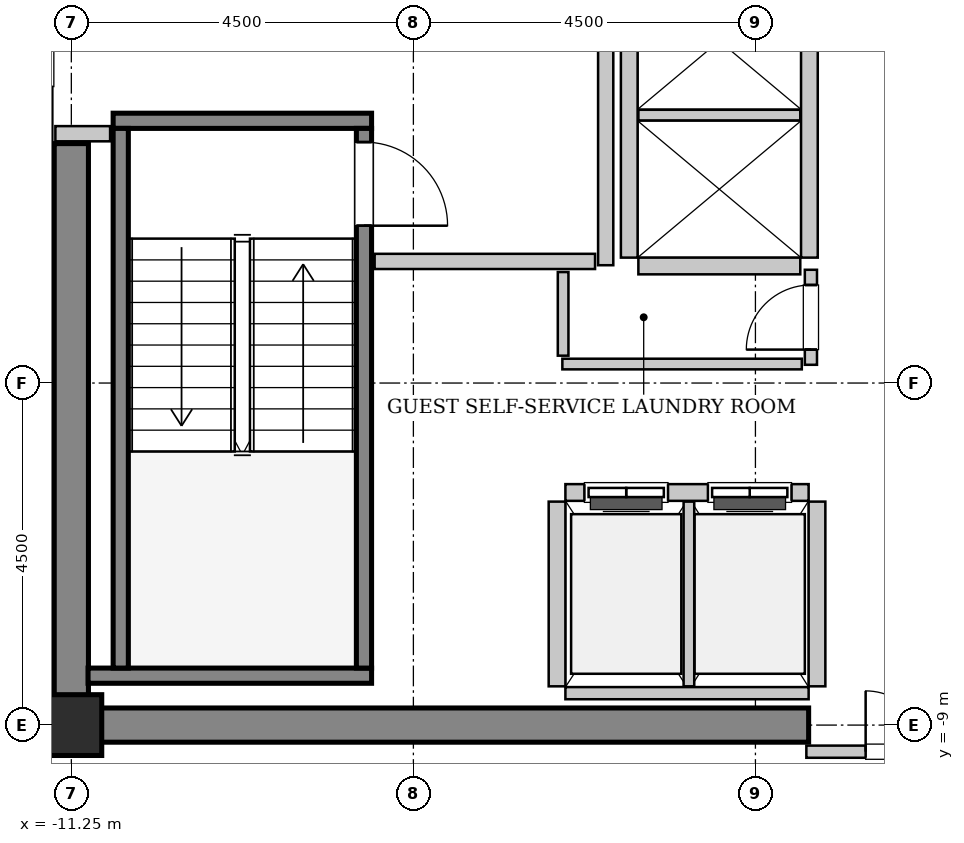
"""IFC4 building model, lengths in metres.
Left out: names, types, materials, properties, quantities, classifications, styles, units other than length and angle.
Written with IfcOpenShell. Run it as: python <this file> out.ifc"""

import sys

from ifc_helpers import new_model, si_unit, direction, frame, frame_2d, origin, origin_2d, place, context, subcontext, project, spatial, rectangle, hollow_rectangle, extrude, source, transform, mapped, element, fill, save


model = new_model("IFC4")
c1 = context("Model", 3, precision=1e-05, world=origin(), true_north=direction((0.0, 1.0)))
c2 = subcontext(c1, "Body", "Model", "MODEL_VIEW")
j1 = project(units=[si_unit("LENGTHUNIT", "METRE"), si_unit("PLANEANGLEUNIT", "RADIAN")], contexts=[c1])
p1 = place(None, origin())
s1 = spatial("IfcSite", under=j1, at=p1, CompositionType="ELEMENT")
p2 = place(p1, origin())
s2 = spatial("IfcBuilding", under=s1, at=p2, CompositionType="ELEMENT")
p3 = place(p2, frame((0.0, 0.0, 248.4)))
s3 = spatial("IfcBuildingStorey", under=s2, at=p3, CompositionType="ELEMENT", Elevation=248.4)
m1 = source(origin(), c2, "Body", "SweptSolid", [
    extrude(rectangle(XDim=9.925, YDim=0.45, at=frame_2d((4.962, 0.0))), origin(), (0.0, 0.0, 1.0), 3.8),
])
p4 = place(p3, frame((-11.475, -9.0, 0.0), z_axis=(0.0, 0.0, 1.0), x_axis=(1.0, 0.0, 0.0)))
e1 = element("IfcWall", 1, at=p4, inside=s3, PredefinedType="SHEAR", context=c2, shape_type="MappedRepresentation", body=[
    mapped(m1, transform((0.0, 0.0, 0.0), x_axis=(1.0, 0.0, 0.0), y_axis=(0.0, 1.0, 0.0), z_axis=(0.0, 0.0, 1.0), scale=1.0)),
])
m2 = source(origin(), c2, "Body", "SweptSolid", [
    extrude(rectangle(XDim=7.425, YDim=0.45, at=frame_2d((3.712, 0.0))), origin(), (0.0, 0.0, 1.0), 3.8),
])
p5 = place(p3, frame((-11.25, -8.775, 0.0), z_axis=(0.0, 0.0, 1.0), x_axis=(0.0, 1.0, 0.0)))
e2 = element("IfcWall", 2, at=p5, inside=s3, PredefinedType="SHEAR", context=c2, shape_type="MappedRepresentation", body=[
    mapped(m2, transform((0.0, 0.0, 0.0), x_axis=(1.0, 0.0, 0.0), y_axis=(0.0, 1.0, 0.0), z_axis=(0.0, 0.0, 1.0), scale=1.0)),
])
m3 = source(origin(), c2, "Body", "SweptSolid", [
    extrude(hollow_rectangle(XDim=0.8, YDim=0.8, WallThickness=0.04, InnerFilletRadius=0.04, OuterFilletRadius=0.08, at=origin_2d()), origin(), (0.0, 0.0, 1.0), 3.8),
])
p6 = place(p3, frame((-11.25, -9.0, 0.0), z_axis=(0.0, 0.0, 1.0), x_axis=(1.0, 0.0, 0.0)))
e3 = element("IfcColumn", 3, at=p6, inside=s3, PredefinedType="COLUMN", context=c2, shape_type="MappedRepresentation", body=[
    mapped(m3, transform((0.0, 0.0, 0.0), x_axis=(1.0, 0.0, 0.0), y_axis=(0.0, 1.0, 0.0), z_axis=(0.0, 0.0, 1.0), scale=1.0)),
])
m4 = source(origin(), c2, "Body", "SweptSolid", [
    extrude(rectangle(XDim=3.4, YDim=0.2, at=frame_2d((1.7, 0.0))), origin(), (0.0, 0.0, 1.0), 3.8),
])
p7 = place(p3, frame((-10.7, -1.05, 0.0), z_axis=(0.0, 0.0, 1.0), x_axis=(1.0, 0.0, 0.0)))
e4 = element("IfcWall", 4, at=p7, inside=s3, PredefinedType="SOLIDWALL", context=c2, shape_type="MappedRepresentation", body=[
    mapped(m4, transform((0.0, 0.0, 0.0), x_axis=(1.0, 0.0, 0.0), y_axis=(0.0, 1.0, 0.0), z_axis=(0.0, 0.0, 1.0), scale=1.0)),
])
m5 = source(origin(), c2, "Body", "SweptSolid", [
    extrude(rectangle(XDim=3.73, YDim=0.2, at=frame_2d((1.865, 0.0))), origin(), (0.0, 0.0, 1.0), 3.8),
])
p8 = place(p3, frame((-11.03, -8.35, 0.0), z_axis=(0.0, 0.0, 1.0), x_axis=(1.0, 0.0, 0.0)))
e5 = element("IfcWall", 5, at=p8, inside=s3, PredefinedType="SOLIDWALL", context=c2, shape_type="MappedRepresentation", body=[
    mapped(m5, transform((0.0, 0.0, 0.0), x_axis=(1.0, 0.0, 0.0), y_axis=(0.0, 1.0, 0.0), z_axis=(0.0, 0.0, 1.0), scale=1.0)),
])
m6 = source(origin(), c2, "Body", "SweptSolid", [
    extrude(rectangle(XDim=7.1, YDim=0.2, at=frame_2d((3.55, 0.0))), origin(), (0.0, 0.0, 1.0), 3.8),
])
p9 = place(p3, frame((-10.6, -1.15, 0.0), z_axis=(0.0, 0.0, 1.0), x_axis=(0.0, -1.0, 0.0)))
e6 = element("IfcWall", 6, at=p9, inside=s3, PredefinedType="SOLIDWALL", context=c2, shape_type="MappedRepresentation", body=[
    mapped(m6, transform((0.0, 0.0, 0.0), x_axis=(1.0, 0.0, 0.0), y_axis=(0.0, 1.0, 0.0), z_axis=(0.0, 0.0, 1.0), scale=1.0)),
])
p10 = place(p3, frame((-7.4, -1.15, 0.0), z_axis=(0.0, 0.0, 1.0), x_axis=(0.0, -1.0, 0.0)))
e7 = element("IfcWall", 7, at=p10, inside=s3, PredefinedType="SOLIDWALL", context=c2, shape_type="MappedRepresentation", body=[
    mapped(m6, transform((0.0, 0.0, 0.0), x_axis=(1.0, 0.0, 0.0), y_axis=(0.0, 1.0, 0.0), z_axis=(0.0, 0.0, 1.0), scale=1.0)),
])
p11 = place(p10, frame((0.18, 0.0, 0.0)))
e8 = element("IfcOpeningElement", 8, at=p11, cuts=e7, PredefinedType="OPENING", context=c2, shape_type="SweptSolid", body=[
    extrude(rectangle(XDim=1.1, YDim=2.15, at=frame_2d((0.55, 1.075))), frame((0.0, 0.11, 0.0), z_axis=(0.0, -1.0, 0.0), x_axis=(1.0, 0.0, 0.0)), (0.0, 0.0, 1.0), 0.22),
])
m7 = source(origin(), c2, "Body", "SweptSolid", [
    extrude(rectangle(XDim=3.2, YDim=0.22, at=frame_2d((1.6, 0.0))), origin(), (0.0, 0.0, 1.0), 3.535),
])
p12 = place(p3, frame((-1.55, -5.94, 0.0), z_axis=(0.0, 0.0, 1.0), x_axis=(-1.0, 0.0, 0.0)))
e9 = element("IfcWall", 9, at=p12, inside=s3, PredefinedType="SOLIDWALL", context=c2, shape_type="MappedRepresentation", body=[
    mapped(m7, transform((0.0, 0.0, 0.0), x_axis=(1.0, 0.0, 0.0), y_axis=(0.0, 1.0, 0.0), z_axis=(0.0, 0.0, 1.0), scale=1.0)),
])
p13 = place(p12, frame((1.85, 0.0, 0.0)))
e10 = element("IfcOpeningElement", 10, at=p13, cuts=e9, PredefinedType="OPENING", context=c2, shape_type="SweptSolid", body=[
    extrude(rectangle(XDim=1.1, YDim=2.2, at=frame_2d((0.55, 1.1))), frame((0.0, 0.12, 0.0), z_axis=(0.0, -1.0, 0.0), x_axis=(1.0, 0.0, 0.0)), (0.0, 0.0, 1.0), 0.24),
])
p14 = place(p12, frame((0.225, 0.0, 0.0)))
e11 = element("IfcOpeningElement", 11, at=p14, cuts=e9, PredefinedType="OPENING", context=c2, shape_type="SweptSolid", body=[
    extrude(rectangle(XDim=1.1, YDim=2.2, at=frame_2d((0.55, 1.1))), frame((0.0, 0.12, 0.0), z_axis=(0.0, -1.0, 0.0), x_axis=(1.0, 0.0, 0.0)), (0.0, 0.0, 1.0), 0.24),
])
m8 = source(origin(), c2, "Body", "SweptSolid", [
    extrude(rectangle(XDim=3.2, YDim=0.16, at=frame_2d((1.6, 0.0))), origin(), (0.0, 0.0, 1.0), 2.625),
])
p15 = place(p3, frame((-4.75, -8.58, 0.0), z_axis=(0.0, 0.0, 1.0), x_axis=(1.0, 0.0, 0.0)))
e12 = element("IfcWall", 12, at=p15, inside=s3, PredefinedType="PARTITIONING", context=c2, shape_type="MappedRepresentation", body=[
    mapped(m8, transform((0.0, 0.0, 0.0), x_axis=(1.0, 0.0, 0.0), y_axis=(0.0, 1.0, 0.0), z_axis=(0.0, 0.0, 1.0), scale=1.0)),
])
m9 = source(origin(), c2, "Body", "SweptSolid", [
    extrude(rectangle(XDim=2.43, YDim=0.22, at=frame_2d((1.215, 0.0))), origin(), (0.0, 0.0, 1.0), 3.535),
])
p16 = place(p3, frame((-4.86, -6.06, 0.0), z_axis=(0.0, 0.0, 1.0), x_axis=(0.0, -1.0, 0.0)))
e13 = element("IfcWall", 13, at=p16, inside=s3, PredefinedType="SOLIDWALL", context=c2, shape_type="MappedRepresentation", body=[
    mapped(m9, transform((0.0, 0.0, 0.0), x_axis=(1.0, 0.0, 0.0), y_axis=(0.0, 1.0, 0.0), z_axis=(0.0, 0.0, 1.0), scale=1.0)),
])
m10 = source(origin(), c2, "Body", "SweptSolid", [
    extrude(rectangle(XDim=2.43, YDim=0.14, at=frame_2d((1.215, 0.0))), origin(), (0.0, 0.0, 1.0), 3.535),
])
p17 = place(p3, frame((-3.125, -8.49, 0.0), z_axis=(0.0, 0.0, 1.0), x_axis=(0.0, 1.0, 0.0)))
e14 = element("IfcWall", 14, at=p17, inside=s3, PredefinedType="PARTITIONING", context=c2, shape_type="MappedRepresentation", body=[
    mapped(m10, transform((0.0, 0.0, 0.0), x_axis=(1.0, 0.0, 0.0), y_axis=(0.0, 1.0, 0.0), z_axis=(0.0, 0.0, 1.0), scale=1.0)),
])
p18 = place(p3, frame((-1.44, -8.49, 0.0), z_axis=(0.0, 0.0, 1.0), x_axis=(0.0, 1.0, 0.0)))
e15 = element("IfcWall", 15, at=p18, inside=s3, PredefinedType="SOLIDWALL", context=c2, shape_type="MappedRepresentation", body=[
    mapped(m9, transform((0.0, 0.0, 0.0), x_axis=(1.0, 0.0, 0.0), y_axis=(0.0, 1.0, 0.0), z_axis=(0.0, 0.0, 1.0), scale=1.0)),
])
m11 = source(origin(), c2, "Body", "SweptSolid", [
    extrude(rectangle(XDim=5.7, YDim=0.22, at=frame_2d((2.85, 0.0))), origin(), (0.0, 0.0, 1.0), 3.535),
])
for number, where, z_axis, x_axis in (
    (16, (-1.54, -2.85, 0.0), (0.0, 0.0, 1.0), (0.0, 1.0, 0.0)),
    (17, (-3.91, 2.85, 0.0), (0.0, 0.0, 1.0), (0.0, -1.0, 0.0)),
):
    element("IfcWall", number, at=place(p3, frame(where, z_axis=z_axis, x_axis=x_axis)), inside=s3, PredefinedType="SOLIDWALL", context=c2, shape_type="MappedRepresentation", body=[
        mapped(m11, transform((0.0, 0.0, 0.0), x_axis=(1.0, 0.0, 0.0), y_axis=(0.0, 1.0, 0.0), z_axis=(0.0, 0.0, 1.0), scale=1.0)),
    ])
m12 = source(origin(), c2, "Body", "SweptSolid", [
    extrude(rectangle(XDim=2.13, YDim=0.22, at=frame_2d((1.065, 0.0))), origin(), (0.0, 0.0, 1.0), 3.535),
])
p19 = place(p3, frame((-3.79, -2.96, 0.0), z_axis=(0.0, 0.0, 1.0), x_axis=(1.0, 0.0, 0.0)))
e18 = element("IfcWall", 18, at=p19, inside=s3, PredefinedType="SOLIDWALL", context=c2, shape_type="MappedRepresentation", body=[
    mapped(m12, transform((0.0, 0.0, 0.0), x_axis=(1.0, 0.0, 0.0), y_axis=(0.0, 1.0, 0.0), z_axis=(0.0, 0.0, 1.0), scale=1.0)),
])
m13 = source(origin(), c2, "Body", "SweptSolid", [
    extrude(rectangle(XDim=2.13, YDim=0.14, at=frame_2d((1.065, 0.0))), origin(), (0.0, 0.0, 1.0), 3.535),
])
p20 = place(p3, frame((-3.79, -0.975, 0.0), z_axis=(0.0, 0.0, 1.0), x_axis=(1.0, 0.0, 0.0)))
e19 = element("IfcWall", 19, at=p20, inside=s3, PredefinedType="PARTITIONING", context=c2, shape_type="MappedRepresentation", body=[
    mapped(m13, transform((0.0, 0.0, 0.0), x_axis=(1.0, 0.0, 0.0), y_axis=(0.0, 1.0, 0.0), z_axis=(0.0, 0.0, 1.0), scale=1.0)),
])
m14 = source(origin(), c2, "Body", "SweptSolid", [
    extrude(rectangle(XDim=5.9, YDim=0.2, at=frame_2d((2.95, 0.0))), origin(), (0.0, 0.0, 1.0), 3.535),
])
p21 = place(p3, frame((-4.22, -2.95, 0.0), z_axis=(0.0, 0.0, 1.0), x_axis=(0.0, 1.0, 0.0)))
e20 = element("IfcWall", 20, at=p21, inside=s3, PredefinedType="PARTITIONING", context=c2, shape_type="MappedRepresentation", body=[
    mapped(m14, transform((0.0, 0.0, 0.0), x_axis=(1.0, 0.0, 0.0), y_axis=(0.0, 1.0, 0.0), z_axis=(0.0, 0.0, 1.0), scale=1.0)),
])
m15 = source(origin(), c2, "Body", "SweptSolid", [
    extrude(rectangle(XDim=2.9, YDim=0.2, at=frame_2d((1.45, 0.0))), origin(), (0.0, 0.0, 1.0), 3.535),
])
p22 = place(p3, frame((-7.26, -2.9, 0.0), z_axis=(0.0, 0.0, 1.0), x_axis=(1.0, 0.0, 0.0)))
e21 = element("IfcWall", 21, at=p22, inside=s3, PredefinedType="PARTITIONING", context=c2, shape_type="MappedRepresentation", body=[
    mapped(m15, transform((0.0, 0.0, 0.0), x_axis=(1.0, 0.0, 0.0), y_axis=(0.0, 1.0, 0.0), z_axis=(0.0, 0.0, 1.0), scale=1.0)),
])
m16 = source(origin(), c2, "Body", "SweptSolid", [
    extrude(rectangle(XDim=0.72, YDim=0.2, at=frame_2d((0.36, 0.0))), origin(), (0.0, 0.0, 1.0), 3.535),
])
p23 = place(p3, frame((-11.46, -1.22, 0.0), z_axis=(0.0, 0.0, 1.0), x_axis=(1.0, 0.0, 0.0)))
e22 = element("IfcWall", 22, at=p23, inside=s3, PredefinedType="PARTITIONING", context=c2, shape_type="MappedRepresentation", body=[
    mapped(m16, transform((0.0, 0.0, 0.0), x_axis=(1.0, 0.0, 0.0), y_axis=(0.0, 1.0, 0.0), z_axis=(0.0, 0.0, 1.0), scale=1.0)),
])
m17 = source(origin(), c2, "Body", "SweptSolid", [
    extrude(rectangle(XDim=3.16, YDim=0.16, at=frame_2d((1.58, 0.0))), origin(), (0.0, 0.0, 1.0), 2.625),
])
p24 = place(p3, frame((-1.58, -9.35, 0.0), z_axis=(0.0, 0.0, 1.0), x_axis=(1.0, 0.0, 0.0)))
e23 = element("IfcWall", 23, at=p24, inside=s3, PredefinedType="PARTITIONING", context=c2, shape_type="MappedRepresentation", body=[
    mapped(m17, transform((0.0, 0.0, 0.0), x_axis=(1.0, 0.0, 0.0), y_axis=(0.0, 1.0, 0.0), z_axis=(0.0, 0.0, 1.0), scale=1.0)),
])
p25 = place(p24, frame((0.78, 0.0, 0.0)))
e24 = element("IfcOpeningElement", 24, at=p25, cuts=e23, PredefinedType="OPENING", context=c2, shape_type="SweptSolid", body=[
    extrude(rectangle(XDim=1.6, YDim=2.3, at=frame_2d((0.8, 1.15))), frame((0.0, 0.09, 0.0), z_axis=(0.0, -1.0, 0.0), x_axis=(1.0, 0.0, 0.0)), (0.0, 0.0, 1.0), 0.18),
])
m18 = source(origin(), c2, "Body", "SweptSolid", [
    extrude(rectangle(XDim=1.25, YDim=0.16, at=frame_2d((0.625, 0.0))), origin(), (0.0, 0.0, 1.0), 3.535),
])
p26 = place(p3, frame((-1.52, -4.26, 0.0), z_axis=(0.0, 0.0, 1.0), x_axis=(0.0, 1.0, 0.0)))
e25 = element("IfcWall", 25, at=p26, inside=s3, PredefinedType="PARTITIONING", context=c2, shape_type="MappedRepresentation", body=[
    mapped(m18, transform((0.0, 0.0, 0.0), x_axis=(1.0, 0.0, 0.0), y_axis=(0.0, 1.0, 0.0), z_axis=(0.0, 0.0, 1.0), scale=1.0)),
])
p27 = place(p26, frame((0.2, 0.0, 0.0)))
e26 = element("IfcOpeningElement", 26, at=p27, cuts=e25, PredefinedType="OPENING", context=c2, shape_type="SweptSolid", body=[
    extrude(rectangle(XDim=0.85, YDim=2.1, at=frame_2d((0.425, 1.05))), frame((0.0, 0.09, 0.0), z_axis=(0.0, -1.0, 0.0), x_axis=(1.0, 0.0, 0.0)), (0.0, 0.0, 1.0), 0.18),
])
m19 = source(origin(), c2, "Body", "SweptSolid", [
    extrude(rectangle(XDim=3.15, YDim=0.14, at=frame_2d((1.575, 0.0))), origin(), (0.0, 0.0, 1.0), 3.535),
])
p28 = place(p3, frame((-4.79, -4.25, 0.0), z_axis=(0.0, 0.0, 1.0), x_axis=(1.0, 0.0, 0.0)))
e27 = element("IfcWall", 27, at=p28, inside=s3, PredefinedType="PARTITIONING", context=c2, shape_type="MappedRepresentation", body=[
    mapped(m19, transform((0.0, 0.0, 0.0), x_axis=(1.0, 0.0, 0.0), y_axis=(0.0, 1.0, 0.0), z_axis=(0.0, 0.0, 1.0), scale=1.0)),
])
m20 = source(origin(), c2, "Body", "SweptSolid", [
    extrude(rectangle(XDim=1.1, YDim=0.14, at=frame_2d((0.55, 0.0))), origin(), (0.0, 0.0, 1.0), 3.535),
])
p29 = place(p3, frame((-4.78, -4.14, 0.0), z_axis=(0.0, 0.0, 1.0), x_axis=(0.0, 1.0, 0.0)))
e28 = element("IfcWall", 28, at=p29, inside=s3, PredefinedType="PARTITIONING", context=c2, shape_type="MappedRepresentation", body=[
    mapped(m20, transform((0.0, 0.0, 0.0), x_axis=(1.0, 0.0, 0.0), y_axis=(0.0, 1.0, 0.0), z_axis=(0.0, 0.0, 1.0), scale=1.0)),
])
m21 = source(origin(), c2, "Body", "SweptSolid", [
    extrude(rectangle(XDim=1.1, YDim=2.15, at=frame_2d((0.55, 1.075))), frame((0.0, 0.025, 0.0), z_axis=(0.0, -1.0, 0.0), x_axis=(1.0, 0.0, 0.0)), (0.0, 0.0, 1.0), 0.05),
])
p30 = place(p11, origin())
e29 = element("IfcDoor", 29, at=p30, inside=s3, OperationType="SINGLE_SWING_RIGHT", PredefinedType="DOOR", context=c2, shape_type="MappedRepresentation", body=[
    mapped(m21, transform((0.0, 0.0, 0.0), x_axis=(1.0, 0.0, 0.0), y_axis=(0.0, 1.0, 0.0), z_axis=(0.0, 0.0, 1.0), scale=1.0)),
])
fill(e8, e29)
m22 = source(origin(), c2, "Body", "SweptSolid", [
    extrude(rectangle(XDim=1.1, YDim=2.2, at=frame_2d((0.55, 1.1))), frame((0.0, 0.025, 0.0), z_axis=(0.0, -1.0, 0.0), x_axis=(1.0, 0.0, 0.0)), (0.0, 0.0, 1.0), 0.05),
])
p31 = place(p13, origin())
e30 = element("IfcDoor", 30, at=p31, inside=s3, OperationType="DOUBLE_DOOR_SLIDING", PredefinedType="DOOR", context=c2, shape_type="MappedRepresentation", body=[
    mapped(m22, transform((0.0, 0.0, 0.0), x_axis=(1.0, 0.0, 0.0), y_axis=(0.0, 1.0, 0.0), z_axis=(0.0, 0.0, 1.0), scale=1.0)),
])
fill(e10, e30)
p32 = place(p14, origin())
e31 = element("IfcDoor", 31, at=p32, inside=s3, OperationType="DOUBLE_DOOR_SLIDING", PredefinedType="DOOR", context=c2, shape_type="MappedRepresentation", body=[
    mapped(m22, transform((0.0, 0.0, 0.0), x_axis=(1.0, 0.0, 0.0), y_axis=(0.0, 1.0, 0.0), z_axis=(0.0, 0.0, 1.0), scale=1.0)),
])
fill(e11, e31)
m23 = source(origin(), c2, "Body", "SweptSolid", [
    extrude(rectangle(XDim=1.6, YDim=2.3, at=frame_2d((0.8, 1.15))), frame((0.0, 0.025, 0.0), z_axis=(0.0, -1.0, 0.0), x_axis=(1.0, 0.0, 0.0)), (0.0, 0.0, 1.0), 0.05),
])
p33 = place(p25, origin())
e32 = element("IfcDoor", 32, at=p33, inside=s3, OperationType="DOUBLE_DOOR_SINGLE_SWING", PredefinedType="DOOR", context=c2, shape_type="MappedRepresentation", body=[
    mapped(m23, transform((0.0, 0.0, 0.0), x_axis=(1.0, 0.0, 0.0), y_axis=(0.0, 1.0, 0.0), z_axis=(0.0, 0.0, 1.0), scale=1.0)),
])
fill(e24, e32)
m24 = source(origin(), c2, "Body", "SweptSolid", [
    extrude(rectangle(XDim=0.85, YDim=2.1, at=frame_2d((0.425, 1.05))), frame((0.0, 0.025, 0.0), z_axis=(0.0, -1.0, 0.0), x_axis=(1.0, 0.0, 0.0)), (0.0, 0.0, 1.0), 0.05),
])
p34 = place(p27, origin())
e33 = element("IfcDoor", 33, at=p34, inside=s3, OperationType="SINGLE_SWING_LEFT", PredefinedType="DOOR", context=c2, shape_type="MappedRepresentation", body=[
    mapped(m24, transform((0.0, 0.0, 0.0), x_axis=(1.0, 0.0, 0.0), y_axis=(0.0, 1.0, 0.0), z_axis=(0.0, 0.0, 1.0), scale=1.0)),
])
fill(e26, e33)
save(model, sys.argv[1])
